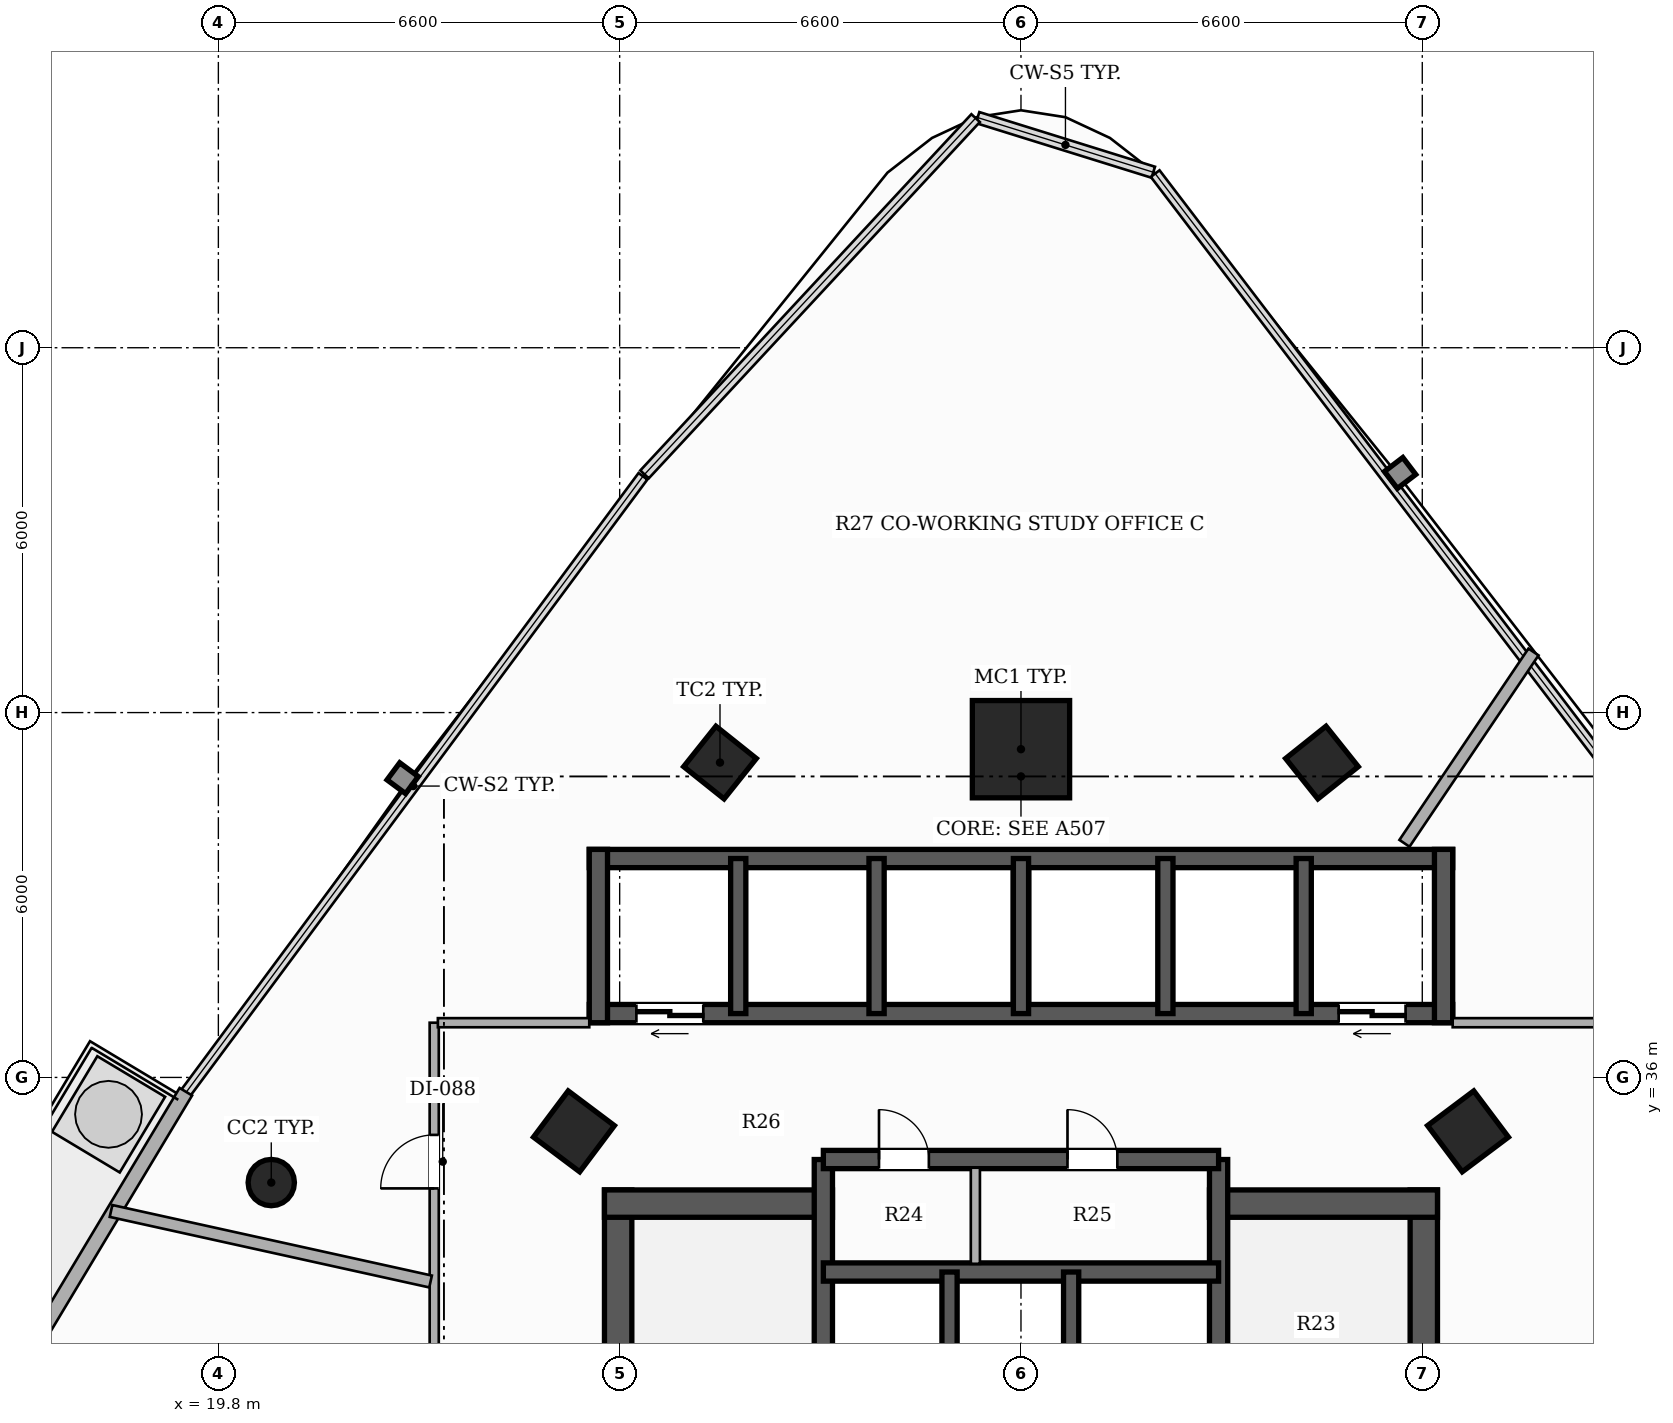
"""IFC4 building model, lengths in metres.
Left out: names, types, materials, properties, quantities, classifications, styles, units other than length and angle.
Written with IfcOpenShell. Run it as: python <this file> out.ifc"""

import sys

from ifc_helpers import new_model, si_unit, direction, frame, frame_2d, origin, origin_2d, place, context, subcontext, project, spatial, rectangle, hollow_rectangle, hollow_circle, extrude, element, fill, save


model = new_model("IFC4")
c1 = context("Model", 3, precision=1e-05, world=origin(), true_north=direction((0.0, 1.0)))
c2 = subcontext(c1, "Body", "Model", "MODEL_VIEW")
j1 = project(units=[si_unit("LENGTHUNIT", "METRE"), si_unit("PLANEANGLEUNIT", "RADIAN")], contexts=[c1])
p1 = place(None, origin())
s1 = spatial("IfcSite", under=j1, at=p1, CompositionType="ELEMENT")
p2 = place(p1, origin())
s2 = spatial("IfcBuilding", under=s1, at=p2, CompositionType="ELEMENT")
p3 = place(p2, frame((0.0, 0.0, 56.6)))
s3 = spatial("IfcBuildingStorey", under=s2, at=p3, CompositionType="ELEMENT", Elevation=56.6)
p4 = place(p3, frame((26.375, 26.45, 0.0), z_axis=(0.0, 0.0, 1.0), x_axis=(0.0, 1.0, 0.0)))
e1 = element("IfcWall", 1, at=p4, inside=s3, PredefinedType="SHEAR", context=c2, shape_type="SweptSolid", body=[
    extrude(rectangle(XDim=7.7, YDim=0.45, at=frame_2d((3.85, 0.0))), origin(), (0.0, 0.0, 1.0), 3.3),
])
p5 = place(p3, frame((26.15, 33.925, 0.0), z_axis=(0.0, 0.0, 1.0), x_axis=(1.0, 0.0, 0.0)))
e2 = element("IfcWall", 2, at=p5, inside=s3, PredefinedType="SHEAR", context=c2, shape_type="SweptSolid", body=[
    extrude(rectangle(XDim=3.75, YDim=0.45, at=frame_2d((1.875, 0.0))), origin(), (0.0, 0.0, 1.0), 3.3),
])
p6 = place(p3, frame((39.625, 26.45, 0.0), z_axis=(0.0, 0.0, 1.0), x_axis=(0.0, 1.0, 0.0)))
e3 = element("IfcWall", 3, at=p6, inside=s3, PredefinedType="SHEAR", context=c2, shape_type="SweptSolid", body=[
    extrude(rectangle(XDim=7.7, YDim=0.45, at=frame_2d((3.85, 0.0))), origin(), (0.0, 0.0, 1.0), 3.3),
])
p7 = place(p3, frame((36.1, 33.925, 0.0), z_axis=(0.0, 0.0, 1.0), x_axis=(1.0, 0.0, 0.0)))
e4 = element("IfcWall", 4, at=p7, inside=s3, PredefinedType="SHEAR", context=c2, shape_type="SweptSolid", body=[
    extrude(rectangle(XDim=3.75, YDim=0.45, at=frame_2d((1.875, 0.0))), origin(), (0.0, 0.0, 1.0), 3.3),
])
p8 = place(p3, frame((29.75, 26.45, 0.0), z_axis=(0.0, 0.0, 1.0), x_axis=(0.0, 1.0, 0.0)))
e5 = element("IfcWall", 5, at=p8, inside=s3, PredefinedType="SHEAR", context=c2, shape_type="SweptSolid", body=[
    extrude(rectangle(XDim=8.2, YDim=0.3, at=frame_2d((4.1, 0.0))), origin(), (0.0, 0.0, 1.0), 3.3),
])
p9 = place(p8, frame((0.6, 0.0, 0.0)))
e6 = element("IfcOpeningElement", 6, at=p9, cuts=e5, PredefinedType="OPENING", context=c2, shape_type="SweptSolid", body=[
    extrude(rectangle(XDim=1.05, YDim=2.15, at=frame_2d((0.525, 1.075))), frame((0.0, 0.16, 0.0), z_axis=(0.0, -1.0, 0.0), x_axis=(1.0, 0.0, 0.0)), (0.0, 0.0, 1.0), 0.32),
])
p10 = place(p3, frame((36.25, 26.45, 0.0), z_axis=(0.0, 0.0, 1.0), x_axis=(0.0, 1.0, 0.0)))
e7 = element("IfcWall", 7, at=p10, inside=s3, PredefinedType="SHEAR", context=c2, shape_type="SweptSolid", body=[
    extrude(rectangle(XDim=8.2, YDim=0.3, at=frame_2d((4.1, 0.0))), origin(), (0.0, 0.0, 1.0), 3.3),
])
p11 = place(p10, frame((0.6, 0.0, 0.0)))
e8 = element("IfcOpeningElement", 8, at=p11, cuts=e7, PredefinedType="OPENING", context=c2, shape_type="SweptSolid", body=[
    extrude(rectangle(XDim=1.05, YDim=2.15, at=frame_2d((0.525, 1.075))), frame((0.0, 0.16, 0.0), z_axis=(0.0, -1.0, 0.0), x_axis=(1.0, 0.0, 0.0)), (0.0, 0.0, 1.0), 0.32),
])
p12 = place(p3, frame((29.75, 32.8, 0.0), z_axis=(0.0, 0.0, 1.0), x_axis=(1.0, 0.0, 0.0)))
e9 = element("IfcWall", 9, at=p12, inside=s3, PredefinedType="SHEAR", context=c2, shape_type="SweptSolid", body=[
    extrude(rectangle(XDim=6.5, YDim=0.3, at=frame_2d((3.25, 0.0))), origin(), (0.0, 0.0, 1.0), 3.3),
])
for number, where, z_axis, x_axis in (
    (10, (31.825, 29.9, 0.0), (0.0, 0.0, 1.0), (0.0, 1.0, 0.0)),
    (11, (33.825, 29.9, 0.0), (0.0, 0.0, 1.0), (0.0, 1.0, 0.0)),
):
    element("IfcWall", number, at=place(p3, frame(where, z_axis=z_axis, x_axis=x_axis)), inside=s3, PredefinedType="SHEAR", context=c2, shape_type="SweptSolid", body=[
        extrude(rectangle(XDim=2.9, YDim=0.25, at=frame_2d((1.45, 0.0))), origin(), (0.0, 0.0, 1.0), 3.3),
    ])
p13 = place(p3, frame((29.75, 34.65, 0.0), z_axis=(0.0, 0.0, 1.0), x_axis=(1.0, 0.0, 0.0)))
e12 = element("IfcWall", 12, at=p13, inside=s3, PredefinedType="SHEAR", context=c2, shape_type="SweptSolid", body=[
    extrude(rectangle(XDim=6.5, YDim=0.3, at=frame_2d((3.25, 0.0))), origin(), (0.0, 0.0, 1.0), 3.3),
])
p14 = place(p13, frame((0.915, 0.0, 0.0)))
e13 = element("IfcOpeningElement", 13, at=p14, cuts=e12, PredefinedType="OPENING", context=c2, shape_type="SweptSolid", body=[
    extrude(rectangle(XDim=0.82, YDim=2.1, at=frame_2d((0.41, 1.05))), frame((0.0, 0.16, 0.0), z_axis=(0.0, -1.0, 0.0), x_axis=(1.0, 0.0, 0.0)), (0.0, 0.0, 1.0), 0.32),
])
p15 = place(p13, frame((4.015, 0.0, 0.0)))
e14 = element("IfcOpeningElement", 14, at=p15, cuts=e12, PredefinedType="OPENING", context=c2, shape_type="SweptSolid", body=[
    extrude(rectangle(XDim=0.82, YDim=2.1, at=frame_2d((0.41, 1.05))), frame((0.0, 0.16, 0.0), z_axis=(0.0, -1.0, 0.0), x_axis=(1.0, 0.0, 0.0)), (0.0, 0.0, 1.0), 0.32),
])
p16 = place(p3, frame((40.1, 37.05, 0.0), z_axis=(0.0, 0.0, 1.0), x_axis=(-1.0, 0.0, 0.0)))
e15 = element("IfcWall", 15, at=p16, inside=s3, PredefinedType="SHEAR", context=c2, shape_type="SweptSolid", body=[
    extrude(rectangle(XDim=14.2, YDim=0.3, at=frame_2d((7.1, 0.0))), origin(), (0.0, 0.0, 1.0), 3.3),
])
p17 = place(p16, frame((12.325, 0.0, 0.0)))
e16 = element("IfcOpeningElement", 16, at=p17, cuts=e15, PredefinedType="OPENING", context=c2, shape_type="SweptSolid", body=[
    extrude(rectangle(XDim=1.1, YDim=2.2, at=frame_2d((0.55, 1.1))), frame((0.0, 0.16, 0.0), z_axis=(0.0, -1.0, 0.0), x_axis=(1.0, 0.0, 0.0)), (0.0, 0.0, 1.0), 0.32),
])
p18 = place(p16, frame((0.775, 0.0, 0.0)))
e17 = element("IfcOpeningElement", 17, at=p18, cuts=e15, PredefinedType="OPENING", context=c2, shape_type="SweptSolid", body=[
    extrude(rectangle(XDim=1.1, YDim=2.2, at=frame_2d((0.55, 1.1))), frame((0.0, 0.16, 0.0), z_axis=(0.0, -1.0, 0.0), x_axis=(1.0, 0.0, 0.0)), (0.0, 0.0, 1.0), 0.32),
])
p19 = place(p3, frame((25.9, 39.6, 0.0), z_axis=(0.0, 0.0, 1.0), x_axis=(1.0, 0.0, 0.0)))
e18 = element("IfcWall", 18, at=p19, inside=s3, PredefinedType="SHEAR", context=c2, shape_type="SweptSolid", body=[
    extrude(rectangle(XDim=14.2, YDim=0.3, at=frame_2d((7.1, 0.0))), origin(), (0.0, 0.0, 1.0), 3.3),
])
for number, where, z_axis, x_axis in (
    (19, (26.05, 36.9, 0.0), (0.0, 0.0, 1.0), (0.0, 1.0, 0.0)),
    (20, (39.95, 36.9, 0.0), (0.0, 0.0, 1.0), (0.0, 1.0, 0.0)),
):
    element("IfcWall", number, at=place(p3, frame(where, z_axis=z_axis, x_axis=x_axis)), inside=s3, PredefinedType="SHEAR", context=c2, shape_type="SweptSolid", body=[
        extrude(rectangle(XDim=2.85, YDim=0.3, at=frame_2d((1.425, 0.0))), origin(), (0.0, 0.0, 1.0), 3.3),
    ])
for number, where, z_axis, x_axis in (
    (21, (28.35, 37.05, 0.0), (0.0, 0.0, 1.0), (0.0, 1.0, 0.0)),
    (22, (30.625, 37.05, 0.0), (0.0, 0.0, 1.0), (0.0, 1.0, 0.0)),
    (23, (33.0, 37.05, 0.0), (0.0, 0.0, 1.0), (0.0, 1.0, 0.0)),
    (24, (35.375, 37.05, 0.0), (0.0, 0.0, 1.0), (0.0, 1.0, 0.0)),
    (25, (37.65, 37.05, 0.0), (0.0, 0.0, 1.0), (0.0, 1.0, 0.0)),
):
    element("IfcWall", number, at=place(p3, frame(where, z_axis=z_axis, x_axis=x_axis)), inside=s3, PredefinedType="SHEAR", context=c2, shape_type="SweptSolid", body=[
        extrude(rectangle(XDim=2.55, YDim=0.25, at=frame_2d((1.275, 0.0))), origin(), (0.0, 0.0, 1.0), 3.3),
    ])
p20 = place(p3, frame((33.0, 41.398, 0.0), z_axis=(0.0, 0.0, 1.0), x_axis=(1.0, 0.0, 0.0)))
e26 = element("IfcColumn", 26, at=p20, inside=s3, PredefinedType="COLUMN", context=c2, shape_type="SweptSolid", body=[
    extrude(hollow_rectangle(XDim=1.6, YDim=1.6, WallThickness=0.05, at=origin_2d()), origin(), (0.0, 0.0, 1.0), 3.3),
])
for number, where, z_axis, x_axis in (
    (27, (25.648, 35.113, 0.0), (0.0, 0.0, 1.0), (0.6, 0.8, 0.0)),
    (28, (40.352, 35.113, 0.0), (0.0, 0.0, 1.0), (-0.6, 0.8, 0.0)),
):
    element("IfcColumn", number, at=place(p3, frame(where, z_axis=z_axis, x_axis=x_axis)), inside=s3, PredefinedType="COLUMN", context=c2, shape_type="SweptSolid", body=[
        extrude(hollow_rectangle(XDim=0.95, YDim=0.95, WallThickness=0.032, at=origin_2d()), origin(), (0.0, 0.0, 1.0), 3.3),
    ])
for number, where, z_axis, x_axis in (
    (29, (28.05, 41.178, 0.0), (0.0, 0.0, 1.0), (0.624, 0.782, 0.0)),
    (30, (37.95, 41.178, 0.0), (0.0, 0.0, 1.0), (-0.624, 0.782, 0.0)),
):
    element("IfcColumn", number, at=place(p3, frame(where, z_axis=z_axis, x_axis=x_axis)), inside=s3, PredefinedType="COLUMN", context=c2, shape_type="SweptSolid", body=[
        extrude(hollow_rectangle(XDim=0.85, YDim=0.85, WallThickness=0.028, at=origin_2d()), origin(), (0.0, 0.0, 1.0), 3.3),
    ])
p21 = place(p3, frame((20.67, 34.271, 0.0), z_axis=(0.0, 0.0, 1.0), x_axis=(1.0, 0.0, 0.0)))
e31 = element("IfcColumn", 31, at=p21, inside=s3, PredefinedType="COLUMN", context=c2, shape_type="SweptSolid", body=[
    extrude(hollow_circle(Radius=0.381, WallThickness=0.022, at=origin_2d()), origin(), (0.0, 0.0, 1.0), 3.3),
])
p22 = place(p3, frame((19.265, 35.765, 0.0), z_axis=(0.0, 0.0, 1.0), x_axis=(-0.51430869017, -0.857605137121, 0.0)))
e32 = element("IfcWall", 32, at=p22, inside=s3, PredefinedType="SOLIDWALL", context=c2, shape_type="SweptSolid", body=[
    extrude(rectangle(XDim=12.86, YDim=0.24, at=frame_2d((6.43, 0.0))), origin(), (0.0, 0.0, 1.0), 2.584),
])
p23 = place(p22, frame((10.362, 0.0, 0.0)))
e33 = element("IfcOpeningElement", 33, at=p23, cuts=e32, PredefinedType="OPENING", context=c2, shape_type="SweptSolid", body=[
    extrude(rectangle(XDim=1.8, YDim=2.2, at=frame_2d((0.9, 1.1))), frame((0.0, 0.13, 0.0), z_axis=(0.0, -1.0, 0.0), x_axis=(1.0, 0.0, 0.0)), (0.0, 0.0, 1.0), 0.26),
])
p24 = place(p3, frame((32.25, 32.935, 0.0), z_axis=(0.0, 0.0, 1.0), x_axis=(0.0, 1.0, 0.0)))
e34 = element("IfcWall", 34, at=p24, inside=s3, PredefinedType="PARTITIONING", context=c2, shape_type="SweptSolid", body=[
    extrude(rectangle(XDim=1.58, YDim=0.15, at=frame_2d((0.79, 0.0))), origin(), (0.0, 0.0, 1.0), 3.02),
])
p25 = place(p3, frame((40.1, 36.9, 0.0), z_axis=(0.0, 0.0, 1.0), x_axis=(1.0, 0.0, 0.0)))
e35 = element("IfcWall", 35, at=p25, inside=s3, PredefinedType="PARTITIONING", context=c2, shape_type="SweptSolid", body=[
    extrude(rectangle(XDim=2.55, YDim=0.15, at=frame_2d((1.275, 0.0))), origin(), (0.0, 0.0, 1.0), 2.373),
])
p26 = place(p3, frame((23.35, 11.86, 0.0), z_axis=(0.0, 0.0, 1.0), x_axis=(0.0, 1.0, 0.0)))
e36 = element("IfcWall", 36, at=p26, inside=s3, PredefinedType="PARTITIONING", context=c2, shape_type="SweptSolid", body=[
    extrude(rectangle(XDim=25.04, YDim=0.15, at=frame_2d((12.52, 0.0))), origin(), (0.0, 0.0, 1.0), 2.373),
])
p27 = place(p26, frame((15.434, 0.0, 0.0)))
e37 = element("IfcOpeningElement", 37, at=p27, cuts=e36, PredefinedType="OPENING", context=c2, shape_type="SweptSolid", body=[
    extrude(rectangle(XDim=0.88, YDim=2.1, at=frame_2d((0.44, 1.05))), frame((0.0, 0.085, 0.0), z_axis=(0.0, -1.0, 0.0), x_axis=(1.0, 0.0, 0.0)), (0.0, 0.0, 1.0), 0.17),
])
p28 = place(p26, frame((22.315, 0.0, 0.0)))
e38 = element("IfcOpeningElement", 38, at=p28, cuts=e36, PredefinedType="OPENING", context=c2, shape_type="SweptSolid", body=[
    extrude(rectangle(XDim=0.88, YDim=2.1, at=frame_2d((0.44, 1.05))), frame((0.0, 0.085, 0.0), z_axis=(0.0, -1.0, 0.0), x_axis=(1.0, 0.0, 0.0)), (0.0, 0.0, 1.0), 0.17),
])
p29 = place(p26, frame((8.21, 0.0, 0.0)))
e39 = element("IfcOpeningElement", 39, at=p29, cuts=e36, PredefinedType="OPENING", context=c2, shape_type="SweptSolid", body=[
    extrude(rectangle(XDim=0.92, YDim=2.15, at=frame_2d((0.46, 1.075))), frame((0.0, 0.085, 0.0), z_axis=(0.0, -1.0, 0.0), x_axis=(1.0, 0.0, 0.0)), (0.0, 0.0, 1.0), 0.17),
])
p30 = place(p26, frame((2.912, 0.0, 0.0)))
e40 = element("IfcOpeningElement", 40, at=p30, cuts=e36, PredefinedType="OPENING", context=c2, shape_type="SweptSolid", body=[
    extrude(rectangle(XDim=0.92, YDim=2.15, at=frame_2d((0.46, 1.075))), frame((0.0, 0.085, 0.0), z_axis=(0.0, -1.0, 0.0), x_axis=(1.0, 0.0, 0.0)), (0.0, 0.0, 1.0), 0.17),
])
p31 = place(p3, frame((23.41, 36.9, 0.0), z_axis=(0.0, 0.0, 1.0), x_axis=(1.0, 0.0, 0.0)))
e41 = element("IfcWall", 41, at=p31, inside=s3, PredefinedType="PARTITIONING", context=c2, shape_type="SweptSolid", body=[
    extrude(rectangle(XDim=2.49, YDim=0.15, at=frame_2d((1.245, 0.0))), origin(), (0.0, 0.0, 1.0), 2.373),
])
p32 = place(p3, frame((18.035, 33.804, 0.0), z_axis=(0.0, 0.0, 1.0), x_axis=(0.976496681047, -0.215532438172, 0.0)))
e42 = element("IfcWall", 42, at=p32, inside=s3, PredefinedType="PARTITIONING", context=c2, shape_type="SweptSolid", body=[
    extrude(rectangle(XDim=5.382, YDim=0.2, at=frame_2d((2.691, 0.0))), origin(), (0.0, 0.0, 1.0), 2.373),
])
p33 = place(p3, frame((41.429, 42.997, 0.0), z_axis=(0.0, 0.0, 1.0), x_axis=(-0.559086144532, -0.829109572368, 0.0)))
e43 = element("IfcWall", 43, at=p33, inside=s3, PredefinedType="PARTITIONING", context=c2, shape_type="SweptSolid", body=[
    extrude(rectangle(XDim=3.796, YDim=0.2, at=frame_2d((1.898, 0.0))), origin(), (0.0, 0.0, 1.0), 3.02),
])
p34 = place(p17, origin())
e44 = element("IfcDoor", 44, at=p34, inside=s3, OperationType="DOUBLE_DOOR_SLIDING", PredefinedType="DOOR", context=c2, shape_type="SweptSolid", body=[
    extrude(rectangle(XDim=1.1, YDim=2.2, at=frame_2d((0.55, 1.1))), frame((0.0, 0.025, 0.0), z_axis=(0.0, -1.0, 0.0), x_axis=(1.0, 0.0, 0.0)), (0.0, 0.0, 1.0), 0.05),
])
fill(e16, e44)
p35 = place(p18, origin())
e45 = element("IfcDoor", 45, at=p35, inside=s3, OperationType="DOUBLE_DOOR_SLIDING", PredefinedType="DOOR", context=c2, shape_type="SweptSolid", body=[
    extrude(rectangle(XDim=1.1, YDim=2.2, at=frame_2d((0.55, 1.1))), frame((0.0, 0.025, 0.0), z_axis=(0.0, -1.0, 0.0), x_axis=(1.0, 0.0, 0.0)), (0.0, 0.0, 1.0), 0.05),
])
fill(e17, e45)
p36 = place(p14, origin())
e46 = element("IfcDoor", 46, at=p36, inside=s3, OperationType="SINGLE_SWING_LEFT", PredefinedType="DOOR", context=c2, shape_type="SweptSolid", body=[
    extrude(rectangle(XDim=0.82, YDim=2.1, at=frame_2d((0.41, 1.05))), frame((0.0, 0.025, 0.0), z_axis=(0.0, -1.0, 0.0), x_axis=(1.0, 0.0, 0.0)), (0.0, 0.0, 1.0), 0.05),
])
fill(e13, e46)
p37 = place(p15, origin())
e47 = element("IfcDoor", 47, at=p37, inside=s3, OperationType="SINGLE_SWING_LEFT", PredefinedType="DOOR", context=c2, shape_type="SweptSolid", body=[
    extrude(rectangle(XDim=0.82, YDim=2.1, at=frame_2d((0.41, 1.05))), frame((0.0, 0.025, 0.0), z_axis=(0.0, -1.0, 0.0), x_axis=(1.0, 0.0, 0.0)), (0.0, 0.0, 1.0), 0.05),
])
fill(e14, e47)
p38 = place(p28, origin())
e48 = element("IfcDoor", 48, at=p38, inside=s3, OperationType="SINGLE_SWING_LEFT", PredefinedType="DOOR", context=c2, shape_type="SweptSolid", body=[
    extrude(rectangle(XDim=0.88, YDim=2.1, at=frame_2d((0.44, 1.05))), frame((0.0, 0.025, 0.0), z_axis=(0.0, -1.0, 0.0), x_axis=(1.0, 0.0, 0.0)), (0.0, 0.0, 1.0), 0.05),
])
fill(e38, e48)
save(model, sys.argv[1])
